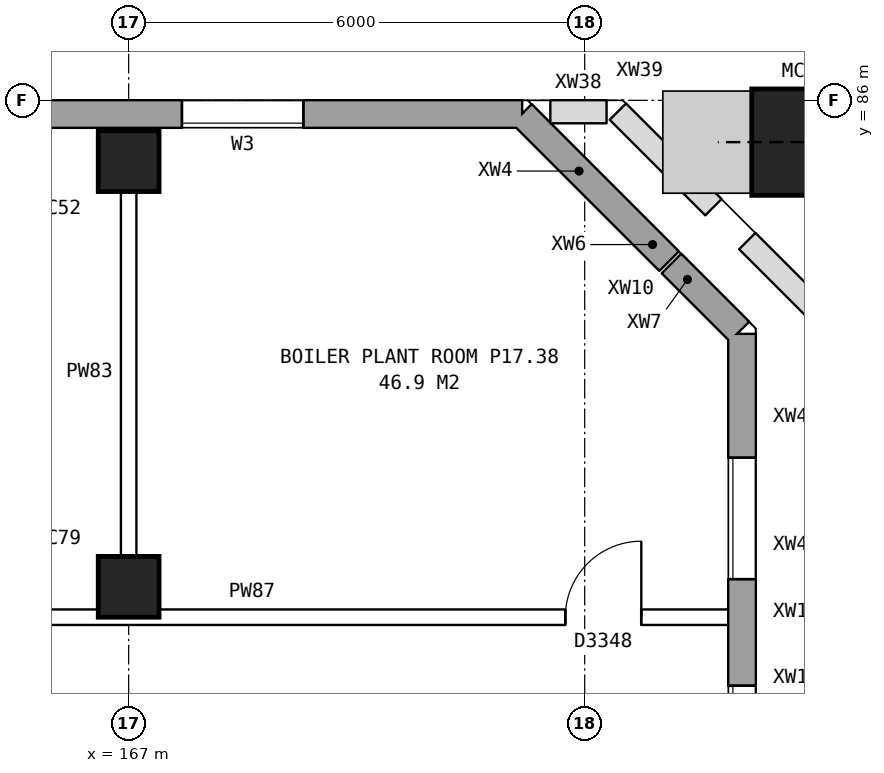
"""IFC4 building model, lengths in metres.
Left out: names, types, materials, properties, quantities, classifications, styles, units other than length and angle.
Written with IfcOpenShell. Run it as: python <this file> out.ifc"""

import sys

from ifc_helpers import new_model, si_unit, direction, frame, frame_2d, origin, origin_2d, place, context, subcontext, project, spatial, rectangle, hollow_rectangle, extrude, element, fill, save


model = new_model("IFC4")
c1 = context("Model", 3, precision=1e-05, world=origin(), true_north=direction((0.0, 1.0)))
c2 = subcontext(c1, "Body", "Model", "MODEL_VIEW")
j1 = project(units=[si_unit("LENGTHUNIT", "METRE"), si_unit("PLANEANGLEUNIT", "RADIAN")], contexts=[c1])
p1 = place(None, origin())
s1 = spatial("IfcSite", under=j1, at=p1, CompositionType="ELEMENT")
p2 = place(p1, origin())
s2 = spatial("IfcBuilding", under=s1, at=p2, CompositionType="ELEMENT")
p3 = place(p2, frame((0.0, 0.0, 62.9)))
s3 = spatial("IfcBuildingStorey", under=s2, at=p3, CompositionType="ELEMENT", Elevation=62.9)
for number, where, z_axis, x_axis in (
    (1, (167.0, 79.6, 0.0), (0.0, 0.0, 1.0), (1.0, 0.0, 0.0)),
    (2, (167.0, 85.2, 0.0), (0.0, 0.0, 1.0), (1.0, 0.0, 0.0)),
):
    element("IfcColumn", number, at=place(p3, frame(where, z_axis=z_axis, x_axis=x_axis)), inside=s3, PredefinedType="COLUMN", context=c2, shape_type="SweptSolid", body=[
        extrude(rectangle(XDim=0.8, YDim=0.8, at=origin_2d()), origin(), (0.0, 0.0, 1.0), 4.2),
    ])
p4 = place(p3, frame((175.898, 85.45, 0.188), z_axis=(-0.267664450709, 0.0, 0.963512190803), x_axis=(0.0, -1.0, 0.0)))
e3 = element("IfcColumn", 3, at=p4, inside=s3, PredefinedType="COLUMN", context=c2, shape_type="SweptSolid", body=[
    extrude(hollow_rectangle(XDim=1.4, YDim=1.4, WallThickness=0.075, at=origin_2d()), origin(), (0.0, 0.0, 1.0), 4.281),
])
p5 = place(p3, frame((175.07, 57.075, 0.0), z_axis=(0.0, 0.0, 1.0), x_axis=(0.0, 1.0, 0.0)))
e4 = element("IfcWall", 4, at=p5, inside=s3, PredefinedType="STANDARD", context=c2, shape_type="SweptSolid", body=[
    extrude(rectangle(XDim=25.851, YDim=0.36, at=frame_2d((12.925, 0.0))), origin(), (0.0, 0.0, 1.0), 4.2),
])
p6 = place(p5, frame((2.6, 0.0, 1.5)))
e5 = element("IfcOpeningElement", 5, at=p6, cuts=e4, PredefinedType="OPENING", context=c2, shape_type="SweptSolid", body=[
    extrude(rectangle(XDim=0.9, YDim=1.2, at=frame_2d((0.45, 0.6))), frame((0.0, 0.19, 0.0), z_axis=(0.0, -1.0, 0.0), x_axis=(1.0, 0.0, 0.0)), (0.0, 0.0, 1.0), 0.38),
])
p7 = place(p5, frame((3.925, 0.0, 1.5)))
e6 = element("IfcOpeningElement", 6, at=p7, cuts=e4, PredefinedType="OPENING", context=c2, shape_type="SweptSolid", body=[
    extrude(rectangle(XDim=0.6, YDim=1.2, at=frame_2d((0.3, 0.6))), frame((0.0, 0.19, 0.0), z_axis=(0.0, -1.0, 0.0), x_axis=(1.0, 0.0, 0.0)), (0.0, 0.0, 1.0), 0.38),
])
p8 = place(p5, frame((7.625, 0.0, 1.5)))
e7 = element("IfcOpeningElement", 7, at=p8, cuts=e4, PredefinedType="OPENING", context=c2, shape_type="SweptSolid", body=[
    extrude(rectangle(XDim=1.6, YDim=1.2, at=frame_2d((0.8, 0.6))), frame((0.0, 0.19, 0.0), z_axis=(0.0, -1.0, 0.0), x_axis=(1.0, 0.0, 0.0)), (0.0, 0.0, 1.0), 0.38),
])
p9 = place(p5, frame((10.625, 0.0, 1.5)))
e8 = element("IfcOpeningElement", 8, at=p9, cuts=e4, PredefinedType="OPENING", context=c2, shape_type="SweptSolid", body=[
    extrude(rectangle(XDim=1.6, YDim=1.2, at=frame_2d((0.8, 0.6))), frame((0.0, 0.19, 0.0), z_axis=(0.0, -1.0, 0.0), x_axis=(1.0, 0.0, 0.0)), (0.0, 0.0, 1.0), 0.38),
])
p10 = place(p5, frame((9.525, 0.0, 1.5)))
e9 = element("IfcOpeningElement", 9, at=p10, cuts=e4, PredefinedType="OPENING", context=c2, shape_type="SweptSolid", body=[
    extrude(rectangle(XDim=0.6, YDim=1.2, at=frame_2d((0.3, 0.6))), frame((0.0, 0.19, 0.0), z_axis=(0.0, -1.0, 0.0), x_axis=(1.0, 0.0, 0.0)), (0.0, 0.0, 1.0), 0.38),
])
p11 = place(p5, frame((14.975, 0.0, 1.5)))
e10 = element("IfcOpeningElement", 10, at=p11, cuts=e4, PredefinedType="OPENING", context=c2, shape_type="SweptSolid", body=[
    extrude(rectangle(XDim=0.6, YDim=1.2, at=frame_2d((0.3, 0.6))), frame((0.0, 0.19, 0.0), z_axis=(0.0, -1.0, 0.0), x_axis=(1.0, 0.0, 0.0)), (0.0, 0.0, 1.0), 0.38),
])
p12 = place(p5, frame((19.625, 0.0, 1.5)))
e11 = element("IfcOpeningElement", 11, at=p12, cuts=e4, PredefinedType="OPENING", context=c2, shape_type="SweptSolid", body=[
    extrude(rectangle(XDim=1.6, YDim=1.2, at=frame_2d((0.8, 0.6))), frame((0.0, 0.19, 0.0), z_axis=(0.0, -1.0, 0.0), x_axis=(1.0, 0.0, 0.0)), (0.0, 0.0, 1.0), 0.38),
])
p13 = place(p5, frame((22.625, 0.0, 1.5)))
e12 = element("IfcOpeningElement", 12, at=p13, cuts=e4, PredefinedType="OPENING", context=c2, shape_type="SweptSolid", body=[
    extrude(rectangle(XDim=1.6, YDim=1.2, at=frame_2d((0.8, 0.6))), frame((0.0, 0.19, 0.0), z_axis=(0.0, -1.0, 0.0), x_axis=(1.0, 0.0, 0.0)), (0.0, 0.0, 1.0), 0.38),
])
p14 = place(p5, frame((15.875, 0.0, 1.5)))
e13 = element("IfcOpeningElement", 13, at=p14, cuts=e4, PredefinedType="OPENING", context=c2, shape_type="SweptSolid", body=[
    extrude(rectangle(XDim=1.2, YDim=1.2, at=frame_2d((0.6, 0.6))), frame((0.0, 0.19, 0.0), z_axis=(0.0, -1.0, 0.0), x_axis=(1.0, 0.0, 0.0)), (0.0, 0.0, 1.0), 0.38),
])
p15 = place(p3, frame((175.035, 82.961, 0.0), z_axis=(0.0, 0.0, 1.0), x_axis=(-0.707106781187, 0.707106781187, 0.0)))
e14 = element("IfcWall", 14, at=p15, inside=s3, PredefinedType="STANDARD", context=c2, shape_type="SweptSolid", body=[
    extrude(rectangle(XDim=0.669, YDim=0.36, at=frame_2d((0.335, 0.0))), origin(), (0.0, 0.0, 1.0), 4.2),
])
p16 = place(p3, frame((174.561, 83.434, 0.953), z_axis=(0.0, 0.0, 1.0), x_axis=(-0.706900055054, 0.707313446899, 0.0)))
e15 = element("IfcWall", 15, at=p16, inside=s3, PredefinedType="STANDARD", context=c2, shape_type="SweptSolid", body=[
    extrude(rectangle(XDim=0.591, YDim=0.36, at=frame_2d((0.295, 0.0))), origin(), (0.0, 0.0, 1.0), 3.247),
])
p17 = place(p3, frame((174.11, 83.886, 0.0), z_axis=(0.0, 0.0, 1.0), x_axis=(-0.707106781187, 0.707106781187, 0.0)))
e16 = element("IfcWall", 16, at=p17, inside=s3, PredefinedType="STANDARD", context=c2, shape_type="SweptSolid", body=[
    extrude(rectangle(XDim=0.613, YDim=0.36, at=frame_2d((0.307, 0.0))), origin(), (0.0, 0.0, 1.0), 3.397),
])
p18 = place(p3, frame((173.676, 84.319, 0.0), z_axis=(0.0, 0.0, 1.0), x_axis=(-0.707106781187, 0.707106781187, 0.0)))
e17 = element("IfcWall", 17, at=p18, inside=s3, PredefinedType="STANDARD", context=c2, shape_type="SweptSolid", body=[
    extrude(rectangle(XDim=2.122, YDim=0.36, at=frame_2d((1.061, 0.0))), origin(), (0.0, 0.0, 1.0), 4.2),
])
p19 = place(p3, frame((172.175, 85.82, 0.0), z_axis=(0.0, 0.0, 1.0), x_axis=(-1.0, 0.0, 0.0)))
e18 = element("IfcWall", 18, at=p19, inside=s3, PredefinedType="STANDARD", context=c2, shape_type="SweptSolid", body=[
    extrude(rectangle(XDim=38.101, YDim=0.36, at=frame_2d((19.05, 0.0))), origin(), (0.0, 0.0, 1.0), 4.2),
])
p20 = place(p19, frame((2.875, 0.0, 1.5)))
e19 = element("IfcOpeningElement", 19, at=p20, cuts=e18, PredefinedType="OPENING", context=c2, shape_type="SweptSolid", body=[
    extrude(rectangle(XDim=1.6, YDim=1.2, at=frame_2d((0.8, 0.6))), frame((0.0, 0.19, 0.0), z_axis=(0.0, -1.0, 0.0), x_axis=(1.0, 0.0, 0.0)), (0.0, 0.0, 1.0), 0.38),
])
p21 = place(p19, frame((7.775, 0.0, 1.5)))
e20 = element("IfcOpeningElement", 20, at=p21, cuts=e18, PredefinedType="OPENING", context=c2, shape_type="SweptSolid", body=[
    extrude(rectangle(XDim=0.6, YDim=1.2, at=frame_2d((0.3, 0.6))), frame((0.0, 0.19, 0.0), z_axis=(0.0, -1.0, 0.0), x_axis=(1.0, 0.0, 0.0)), (0.0, 0.0, 1.0), 0.38),
])
p22 = place(p19, frame((8.675, 0.0, 1.5)))
e21 = element("IfcOpeningElement", 21, at=p22, cuts=e18, PredefinedType="OPENING", context=c2, shape_type="SweptSolid", body=[
    extrude(rectangle(XDim=1.2, YDim=1.2, at=frame_2d((0.6, 0.6))), frame((0.0, 0.19, 0.0), z_axis=(0.0, -1.0, 0.0), x_axis=(1.0, 0.0, 0.0)), (0.0, 0.0, 1.0), 0.38),
])
p23 = place(p19, frame((12.825, 0.0, 1.5)))
e22 = element("IfcOpeningElement", 22, at=p23, cuts=e18, PredefinedType="OPENING", context=c2, shape_type="SweptSolid", body=[
    extrude(rectangle(XDim=1.6, YDim=1.2, at=frame_2d((0.8, 0.6))), frame((0.0, 0.19, 0.0), z_axis=(0.0, -1.0, 0.0), x_axis=(1.0, 0.0, 0.0)), (0.0, 0.0, 1.0), 0.38),
])
p24 = place(p19, frame((14.875, 0.0, 1.5)))
e23 = element("IfcOpeningElement", 23, at=p24, cuts=e18, PredefinedType="OPENING", context=c2, shape_type="SweptSolid", body=[
    extrude(rectangle(XDim=1.6, YDim=1.2, at=frame_2d((0.8, 0.6))), frame((0.0, 0.19, 0.0), z_axis=(0.0, -1.0, 0.0), x_axis=(1.0, 0.0, 0.0)), (0.0, 0.0, 1.0), 0.38),
])
p25 = place(p19, frame((20.875, 0.0, 1.5)))
e24 = element("IfcOpeningElement", 24, at=p25, cuts=e18, PredefinedType="OPENING", context=c2, shape_type="SweptSolid", body=[
    extrude(rectangle(XDim=1.6, YDim=1.2, at=frame_2d((0.8, 0.6))), frame((0.0, 0.19, 0.0), z_axis=(0.0, -1.0, 0.0), x_axis=(1.0, 0.0, 0.0)), (0.0, 0.0, 1.0), 0.38),
])
p26 = place(p19, frame((25.525, 0.0, 1.5)))
e25 = element("IfcOpeningElement", 25, at=p26, cuts=e18, PredefinedType="OPENING", context=c2, shape_type="SweptSolid", body=[
    extrude(rectangle(XDim=0.9, YDim=1.2, at=frame_2d((0.45, 0.6))), frame((0.0, 0.19, 0.0), z_axis=(0.0, -1.0, 0.0), x_axis=(1.0, 0.0, 0.0)), (0.0, 0.0, 1.0), 0.38),
])
p27 = place(p19, frame((26.875, 0.0, 1.5)))
e26 = element("IfcOpeningElement", 26, at=p27, cuts=e18, PredefinedType="OPENING", context=c2, shape_type="SweptSolid", body=[
    extrude(rectangle(XDim=1.6, YDim=1.2, at=frame_2d((0.8, 0.6))), frame((0.0, 0.19, 0.0), z_axis=(0.0, -1.0, 0.0), x_axis=(1.0, 0.0, 0.0)), (0.0, 0.0, 1.0), 0.38),
])
p28 = place(p19, frame((29.375, 0.0, 1.5)))
e27 = element("IfcOpeningElement", 27, at=p28, cuts=e18, PredefinedType="OPENING", context=c2, shape_type="SweptSolid", body=[
    extrude(rectangle(XDim=0.9, YDim=1.2, at=frame_2d((0.45, 0.6))), frame((0.0, 0.19, 0.0), z_axis=(0.0, -1.0, 0.0), x_axis=(1.0, 0.0, 0.0)), (0.0, 0.0, 1.0), 0.38),
])
p29 = place(p19, frame((32.875, 0.0, 1.5)))
e28 = element("IfcOpeningElement", 28, at=p29, cuts=e18, PredefinedType="OPENING", context=c2, shape_type="SweptSolid", body=[
    extrude(rectangle(XDim=1.6, YDim=1.2, at=frame_2d((0.8, 0.6))), frame((0.0, 0.19, 0.0), z_axis=(0.0, -1.0, 0.0), x_axis=(1.0, 0.0, 0.0)), (0.0, 0.0, 1.0), 0.38),
])
p30 = place(p3, frame((176.242, 83.045, 0.0), z_axis=(0.0, 0.0, 1.0), x_axis=(-0.707106781187, 0.707106781187, 0.0)))
e29 = element("IfcWall", 29, at=p30, inside=s3, PredefinedType="PARAPET", context=c2, shape_type="SweptSolid", body=[
    extrude(rectangle(XDim=1.558, YDim=0.3, at=frame_2d((0.779, 0.0))), origin(), (0.0, 0.0, 1.0), 1.1),
])
p31 = place(p3, frame((174.692, 84.595, 0.0), z_axis=(0.0, 0.0, 1.0), x_axis=(-0.707037973054, 0.707175582624, 0.0)))
e30 = element("IfcWall", 30, at=p31, inside=s3, PredefinedType="PARAPET", context=c2, shape_type="SweptSolid", body=[
    extrude(rectangle(XDim=1.774, YDim=0.3, at=frame_2d((0.887, 0.0))), origin(), (0.0, 0.0, 1.0), 1.1),
])
p32 = place(p3, frame((173.286, 85.85, 0.0), z_axis=(0.0, 0.0, 1.0), x_axis=(-1.0, 0.0, 0.0)))
e31 = element("IfcWall", 31, at=p32, inside=s3, PredefinedType="PARAPET", context=c2, shape_type="SweptSolid", body=[
    extrude(rectangle(XDim=0.736, YDim=0.3, at=frame_2d((0.368, 0.0))), origin(), (0.0, 0.0, 1.0), 1.1),
])
p33 = place(p3, frame((131.24, 79.2, 0.0), z_axis=(0.0, 0.0, 1.0), x_axis=(1.0, 0.0, 0.0)))
e32 = element("IfcWall", 32, at=p33, inside=s3, PredefinedType="PARTITIONING", context=c2, shape_type="SweptSolid", body=[
    extrude(rectangle(XDim=43.77, YDim=0.2, at=frame_2d((21.885, 0.0))), origin(), (0.0, 0.0, 1.0), 4.2),
])
p34 = place(p33, frame((2.44, 0.0, 0.0)))
e33 = element("IfcOpeningElement", 33, at=p34, cuts=e32, PredefinedType="OPENING", context=c2, shape_type="SweptSolid", body=[
    extrude(rectangle(XDim=1.0, YDim=2.1, at=frame_2d((0.5, 1.05))), frame((0.0, 0.11, 0.0), z_axis=(0.0, -1.0, 0.0), x_axis=(1.0, 0.0, 0.0)), (0.0, 0.0, 1.0), 0.22),
])
p35 = place(p33, frame((8.26, 0.0, 0.0)))
e34 = element("IfcOpeningElement", 34, at=p35, cuts=e32, PredefinedType="OPENING", context=c2, shape_type="SweptSolid", body=[
    extrude(rectangle(XDim=1.0, YDim=2.1, at=frame_2d((0.5, 1.05))), frame((0.0, 0.11, 0.0), z_axis=(0.0, -1.0, 0.0), x_axis=(1.0, 0.0, 0.0)), (0.0, 0.0, 1.0), 0.22),
])
p36 = place(p33, frame((14.26, 0.0, 0.0)))
e35 = element("IfcOpeningElement", 35, at=p36, cuts=e32, PredefinedType="OPENING", context=c2, shape_type="SweptSolid", body=[
    extrude(rectangle(XDim=1.0, YDim=2.1, at=frame_2d((0.5, 1.05))), frame((0.0, 0.11, 0.0), z_axis=(0.0, -1.0, 0.0), x_axis=(1.0, 0.0, 0.0)), (0.0, 0.0, 1.0), 0.22),
])
p37 = place(p33, frame((20.26, 0.0, 0.0)))
e36 = element("IfcOpeningElement", 36, at=p37, cuts=e32, PredefinedType="OPENING", context=c2, shape_type="SweptSolid", body=[
    extrude(rectangle(XDim=1.0, YDim=2.1, at=frame_2d((0.5, 1.05))), frame((0.0, 0.11, 0.0), z_axis=(0.0, -1.0, 0.0), x_axis=(1.0, 0.0, 0.0)), (0.0, 0.0, 1.0), 0.22),
])
p38 = place(p33, frame((26.26, 0.0, 0.0)))
e37 = element("IfcOpeningElement", 37, at=p38, cuts=e32, PredefinedType="OPENING", context=c2, shape_type="SweptSolid", body=[
    extrude(rectangle(XDim=1.0, YDim=2.1, at=frame_2d((0.5, 1.05))), frame((0.0, 0.11, 0.0), z_axis=(0.0, -1.0, 0.0), x_axis=(1.0, 0.0, 0.0)), (0.0, 0.0, 1.0), 0.22),
])
p39 = place(p33, frame((32.26, 0.0, 0.0)))
e38 = element("IfcOpeningElement", 38, at=p39, cuts=e32, PredefinedType="OPENING", context=c2, shape_type="SweptSolid", body=[
    extrude(rectangle(XDim=1.0, YDim=2.1, at=frame_2d((0.5, 1.05))), frame((0.0, 0.11, 0.0), z_axis=(0.0, -1.0, 0.0), x_axis=(1.0, 0.0, 0.0)), (0.0, 0.0, 1.0), 0.22),
])
p40 = place(p33, frame((41.505, 0.0, 0.0)))
e39 = element("IfcOpeningElement", 39, at=p40, cuts=e32, PredefinedType="OPENING", context=c2, shape_type="SweptSolid", body=[
    extrude(rectangle(XDim=1.0, YDim=2.1, at=frame_2d((0.5, 1.05))), frame((0.0, 0.11, 0.0), z_axis=(0.0, -1.0, 0.0), x_axis=(1.0, 0.0, 0.0)), (0.0, 0.0, 1.0), 0.22),
])
p41 = place(p3, frame((167.0, 79.1, 0.0), z_axis=(0.0, 0.0, 1.0), x_axis=(0.0, 1.0, 0.0)))
e40 = element("IfcWall", 40, at=p41, inside=s3, PredefinedType="PARTITIONING", context=c2, shape_type="SweptSolid", body=[
    extrude(rectangle(XDim=6.66, YDim=0.2, at=frame_2d((3.33, 0.0))), origin(), (0.0, 0.0, 1.0), 4.2),
])
p42 = place(p12, origin())
e41 = element("IfcWindow", 41, at=p42, inside=s3, PartitioningType="DOUBLE_PANEL_HORIZONTAL", PredefinedType="WINDOW", context=c2, shape_type="SweptSolid", body=[
    extrude(rectangle(XDim=1.6, YDim=1.2, at=frame_2d((0.8, 0.6))), frame((0.0, 0.15, 0.0), z_axis=(0.0, -1.0, 0.0), x_axis=(1.0, 0.0, 0.0)), (0.0, 0.0, 1.0), 0.06),
])
fill(e11, e41)
p43 = place(p13, origin())
e42 = element("IfcWindow", 42, at=p43, inside=s3, PartitioningType="DOUBLE_PANEL_HORIZONTAL", PredefinedType="WINDOW", context=c2, shape_type="SweptSolid", body=[
    extrude(rectangle(XDim=1.6, YDim=1.2, at=frame_2d((0.8, 0.6))), frame((0.0, 0.15, 0.0), z_axis=(0.0, -1.0, 0.0), x_axis=(1.0, 0.0, 0.0)), (0.0, 0.0, 1.0), 0.06),
])
fill(e12, e42)
p44 = place(p20, origin())
e43 = element("IfcWindow", 43, at=p44, inside=s3, PartitioningType="DOUBLE_PANEL_HORIZONTAL", PredefinedType="WINDOW", context=c2, shape_type="SweptSolid", body=[
    extrude(rectangle(XDim=1.6, YDim=1.2, at=frame_2d((0.8, 0.6))), frame((0.0, 0.15, 0.0), z_axis=(0.0, -1.0, 0.0), x_axis=(1.0, 0.0, 0.0)), (0.0, 0.0, 1.0), 0.06),
])
fill(e19, e43)
p45 = place(p40, origin())
e44 = element("IfcDoor", 44, at=p45, inside=s3, OperationType="SINGLE_SWING_RIGHT", PredefinedType="DOOR", context=c2, shape_type="SweptSolid", body=[
    extrude(rectangle(XDim=1.0, YDim=2.1, at=frame_2d((0.5, 1.05))), frame((0.0, 0.025, 0.0), z_axis=(0.0, -1.0, 0.0), x_axis=(1.0, 0.0, 0.0)), (0.0, 0.0, 1.0), 0.05),
])
fill(e39, e44)
save(model, sys.argv[1])
